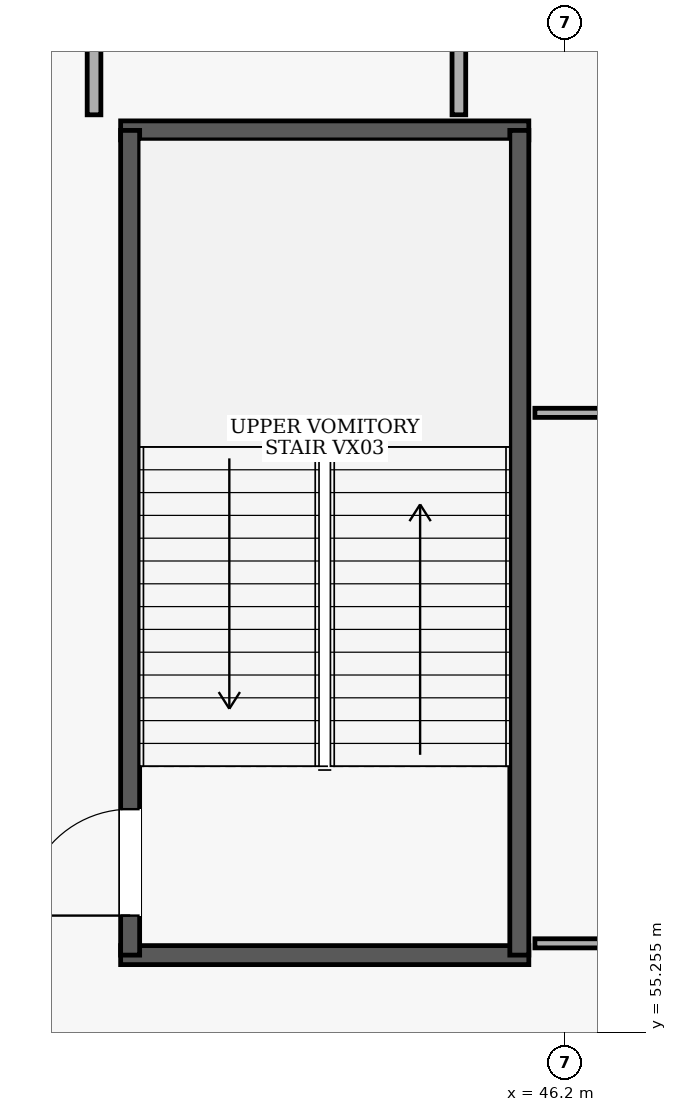
"""IFC4 building model, lengths in metres.
Left out: names, types, materials, properties, quantities, classifications, styles, units other than length and angle.
Written with IfcOpenShell. Run it as: python <this file> out.ifc"""

import sys

from ifc_helpers import new_model, si_unit, direction, frame, frame_2d, origin, place, context, subcontext, project, spatial, rectangle, extrude, element, fill, save


model = new_model("IFC4")
c1 = context("Model", 3, precision=1e-05, world=origin(), true_north=direction((0.0, 1.0)))
c2 = subcontext(c1, "Body", "Model", "MODEL_VIEW")
j1 = project(units=[si_unit("LENGTHUNIT", "METRE"), si_unit("PLANEANGLEUNIT", "RADIAN")], contexts=[c1])
p1 = place(None, origin())
s1 = spatial("IfcSite", under=j1, at=p1, CompositionType="ELEMENT")
p2 = place(p1, origin())
s2 = spatial("IfcBuilding", under=s1, at=p2, CompositionType="ELEMENT")
p3 = place(p2, frame((0.0, 0.0, 10.2)))
s3 = spatial("IfcBuildingStorey", under=s2, at=p3, CompositionType="ELEMENT", Elevation=10.2)
for number, where, z_axis, x_axis in (
    (1, (40.35, 56.275, 0.0), (0.0, 0.0, 1.0), (1.0, 0.0, 0.0)),
    (2, (45.72, 67.125, 0.0), (0.0, 0.0, 1.0), (-1.0, 0.0, 0.0)),
):
    element("IfcWall", number, at=place(p3, frame(where, z_axis=z_axis, x_axis=x_axis)), inside=s3, PredefinedType="SHEAR", context=c2, shape_type="SweptSolid", body=[
        extrude(rectangle(XDim=5.37, YDim=0.25, at=frame_2d((2.685, 0.0))), origin(), (0.0, 0.0, 1.0), 4.48),
    ])
p4 = place(p3, frame((40.475, 56.275, 0.0), z_axis=(0.0, 0.0, 1.0), x_axis=(0.0, 1.0, 0.0)))
e3 = element("IfcWall", 3, at=p4, inside=s3, PredefinedType="SHEAR", context=c2, shape_type="SweptSolid", body=[
    extrude(rectangle(XDim=10.85, YDim=0.25, at=frame_2d((5.425, 0.0))), origin(), (0.0, 0.0, 1.0), 4.48),
])
p5 = place(p4, frame((0.52, 0.0, 0.0)))
e4 = element("IfcOpeningElement", 4, at=p5, cuts=e3, PredefinedType="OPENING", context=c2, shape_type="SweptSolid", body=[
    extrude(rectangle(XDim=1.4, YDim=2.15, at=frame_2d((0.7, 1.075))), frame((0.0, 0.135, 0.0), z_axis=(0.0, -1.0, 0.0), x_axis=(1.0, 0.0, 0.0)), (0.0, 0.0, 1.0), 0.27),
])
p6 = place(p3, frame((45.595, 56.275, 0.0), z_axis=(0.0, 0.0, 1.0), x_axis=(0.0, 1.0, 0.0)))
e5 = element("IfcWall", 5, at=p6, inside=s3, PredefinedType="SHEAR", context=c2, shape_type="SweptSolid", body=[
    extrude(rectangle(XDim=10.85, YDim=0.25, at=frame_2d((5.425, 0.0))), origin(), (0.0, 0.0, 1.0), 4.48),
])
p7 = place(p3, frame((44.8, 67.33, 0.0), z_axis=(0.0, 0.0, 1.0), x_axis=(0.0, 1.0, 0.0)))
e6 = element("IfcWall", 6, at=p7, inside=s3, PredefinedType="PARTITIONING", context=c2, shape_type="SweptSolid", body=[
    extrude(rectangle(XDim=3.07, YDim=0.18, at=frame_2d((1.535, 0.0))), origin(), (0.0, 0.0, 1.0), 4.48),
])
p8 = place(p3, frame((40.0, 70.4, 0.0), z_axis=(0.0, 0.0, 1.0), x_axis=(0.0, -1.0, 0.0)))
e7 = element("IfcWall", 7, at=p8, inside=s3, PredefinedType="PARTITIONING", context=c2, shape_type="SweptSolid", body=[
    extrude(rectangle(XDim=3.07, YDim=0.18, at=frame_2d((1.535, 0.0))), origin(), (0.0, 0.0, 1.0), 4.48),
])
p9 = place(p8, frame((1.035, 0.0, 0.0)))
e8 = element("IfcOpeningElement", 8, at=p9, cuts=e7, PredefinedType="OPENING", context=c2, shape_type="SweptSolid", body=[
    extrude(rectangle(XDim=1.0, YDim=2.1, at=frame_2d((0.5, 1.05))), frame((0.0, 0.1, 0.0), z_axis=(0.0, -1.0, 0.0), x_axis=(1.0, 0.0, 0.0)), (0.0, 0.0, 1.0), 0.2),
])
p10 = place(p3, frame((45.8, 56.43, 0.0), z_axis=(0.0, 0.0, 1.0), x_axis=(1.0, 0.0, 0.0)))
e9 = element("IfcWall", 9, at=p10, inside=s3, PredefinedType="PARTITIONING", context=c2, shape_type="SweptSolid", body=[
    extrude(rectangle(XDim=14.8, YDim=0.12, at=frame_2d((7.4, 0.0))), origin(), (0.0, 0.0, 1.0), 4.48),
])
p11 = place(p10, frame((6.875, 0.0, 0.0)))
e10 = element("IfcOpeningElement", 10, at=p11, cuts=e9, PredefinedType="OPENING", context=c2, shape_type="SweptSolid", body=[
    extrude(rectangle(XDim=1.05, YDim=2.15, at=frame_2d((0.525, 1.075))), frame((0.0, 0.07, 0.0), z_axis=(0.0, -1.0, 0.0), x_axis=(1.0, 0.0, 0.0)), (0.0, 0.0, 1.0), 0.14),
])
p12 = place(p3, frame((60.6, 63.409, 0.0), z_axis=(0.0, 0.0, 1.0), x_axis=(-1.0, 0.0, 0.0)))
e11 = element("IfcWall", 11, at=p12, inside=s3, PredefinedType="PARTITIONING", context=c2, shape_type="SweptSolid", body=[
    extrude(rectangle(XDim=14.8, YDim=0.12, at=frame_2d((7.4, 0.0))), origin(), (0.0, 0.0, 1.0), 4.48),
])
p13 = place(p5, frame((1.4, 0.0, 0.0), z_axis=(0.0, 0.0, 1.0), x_axis=(-1.0, 0.0, 0.0)))
e12 = element("IfcDoor", 12, at=p13, inside=s3, OperationType="SINGLE_SWING_RIGHT", PredefinedType="DOOR", context=c2, shape_type="SweptSolid", body=[
    extrude(rectangle(XDim=1.4, YDim=2.15, at=frame_2d((0.7, 1.075))), frame((0.0, 0.025, 0.0), z_axis=(0.0, -1.0, 0.0), x_axis=(1.0, 0.0, 0.0)), (0.0, 0.0, 1.0), 0.05),
])
fill(e4, e12)
save(model, sys.argv[1])
